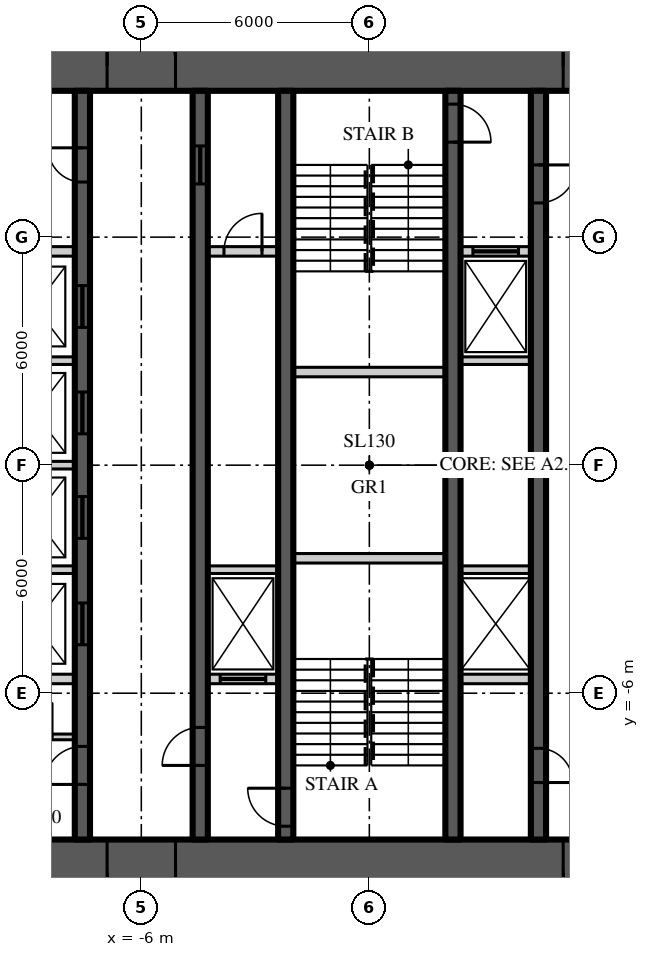
"""IFC4 building model, lengths in metres.
Left out: names, types, materials, properties, quantities, classifications, styles, units other than length and angle.
Written with IfcOpenShell. Run it as: python <this file> out.ifc"""

import sys

from ifc_helpers import new_model, si_unit, direction, frame, frame_2d, origin, place, context, subcontext, project, spatial, rectangle, extrude, element, fill, save


model = new_model("IFC4")
c1 = context("Model", 3, precision=1e-05, world=origin(), true_north=direction((0.0, 1.0)))
c2 = subcontext(c1, "Body", "Model", "MODEL_VIEW")
j1 = project(units=[si_unit("LENGTHUNIT", "METRE"), si_unit("PLANEANGLEUNIT", "RADIAN")], contexts=[c1])
p1 = place(None, origin())
s1 = spatial("IfcSite", under=j1, at=p1, CompositionType="ELEMENT")
p2 = place(p1, origin())
s2 = spatial("IfcBuilding", under=s1, at=p2, CompositionType="ELEMENT")
p3 = place(p2, frame((0.0, 0.0, 82.5)))
s3 = spatial("IfcBuildingStorey", under=s2, at=p3, CompositionType="ELEMENT", Elevation=82.5)
p4 = place(p3, frame((-11.15, 10.5, 0.0), z_axis=(0.0, 0.0, 1.0), x_axis=(1.0, 0.0, 0.0)))
e1 = element("IfcWall", 1, at=p4, inside=s3, PredefinedType="SHEAR", context=c2, shape_type="SweptSolid", body=[
    extrude(rectangle(XDim=22.3, YDim=1.3, at=frame_2d((11.15, 0.0))), origin(), (0.0, 0.0, 1.0), 3.9),
])
p5 = place(p4, frame((4.25, 0.0, 0.0)))
e2 = element("IfcOpeningElement", 2, at=p5, cuts=e1, PredefinedType="OPENING", context=c2, shape_type="SweptSolid", body=[
    extrude(rectangle(XDim=1.8, YDim=2.2, at=frame_2d((0.9, 1.1))), frame((0.0, 0.66, 0.0), z_axis=(0.0, -1.0, 0.0), x_axis=(1.0, 0.0, 0.0)), (0.0, 0.0, 1.0), 1.32),
])
p6 = place(p4, frame((16.25, 0.0, 0.0)))
e3 = element("IfcOpeningElement", 3, at=p6, cuts=e1, PredefinedType="OPENING", context=c2, shape_type="SweptSolid", body=[
    extrude(rectangle(XDim=1.8, YDim=2.2, at=frame_2d((0.9, 1.1))), frame((0.0, 0.66, 0.0), z_axis=(0.0, -1.0, 0.0), x_axis=(1.0, 0.0, 0.0)), (0.0, 0.0, 1.0), 1.32),
])
p7 = place(p3, frame((11.15, -10.5, 0.0), z_axis=(0.0, 0.0, 1.0), x_axis=(-1.0, 0.0, 0.0)))
e4 = element("IfcWall", 4, at=p7, inside=s3, PredefinedType="SHEAR", context=c2, shape_type="SweptSolid", body=[
    extrude(rectangle(XDim=22.3, YDim=1.3, at=frame_2d((11.15, 0.0))), origin(), (0.0, 0.0, 1.0), 3.9),
])
p8 = place(p7, frame((16.25, 0.0, 0.0)))
e5 = element("IfcOpeningElement", 5, at=p8, cuts=e4, PredefinedType="OPENING", context=c2, shape_type="SweptSolid", body=[
    extrude(rectangle(XDim=1.8, YDim=2.2, at=frame_2d((0.9, 1.1))), frame((0.0, 0.66, 0.0), z_axis=(0.0, -1.0, 0.0), x_axis=(1.0, 0.0, 0.0)), (0.0, 0.0, 1.0), 1.32),
])
p9 = place(p7, frame((4.25, 0.0, 0.0)))
e6 = element("IfcOpeningElement", 6, at=p9, cuts=e4, PredefinedType="OPENING", context=c2, shape_type="SweptSolid", body=[
    extrude(rectangle(XDim=1.8, YDim=2.2, at=frame_2d((0.9, 1.1))), frame((0.0, 0.66, 0.0), z_axis=(0.0, -1.0, 0.0), x_axis=(1.0, 0.0, 0.0)), (0.0, 0.0, 1.0), 1.32),
])
p10 = place(p3, frame((-7.55, -9.85, 0.0), z_axis=(0.0, 0.0, 1.0), x_axis=(0.0, 1.0, 0.0)))
e7 = element("IfcWall", 7, at=p10, inside=s3, PredefinedType="SHEAR", context=c2, shape_type="SweptSolid", body=[
    extrude(rectangle(XDim=19.7, YDim=0.4, at=frame_2d((9.85, 0.0))), origin(), (0.0, 0.0, 1.0), 3.9),
])
p11 = place(p10, frame((1.45, 0.0, 0.0)))
e8 = element("IfcOpeningElement", 8, at=p11, cuts=e7, PredefinedType="OPENING", context=c2, shape_type="SweptSolid", body=[
    extrude(rectangle(XDim=1.0, YDim=2.2, at=frame_2d((0.5, 1.1))), frame((0.0, 0.21, 0.0), z_axis=(0.0, -1.0, 0.0), x_axis=(1.0, 0.0, 0.0)), (0.0, 0.0, 1.0), 0.42),
])
p12 = place(p10, frame((17.3, 0.0, 0.0)))
e9 = element("IfcOpeningElement", 9, at=p12, cuts=e7, PredefinedType="OPENING", context=c2, shape_type="SweptSolid", body=[
    extrude(rectangle(XDim=0.9, YDim=2.1, at=frame_2d((0.45, 1.05))), frame((0.0, 0.21, 0.0), z_axis=(0.0, -1.0, 0.0), x_axis=(1.0, 0.0, 0.0)), (0.0, 0.0, 1.0), 0.42),
])
p13 = place(p10, frame((5.125, 0.0, 0.0)))
e10 = element("IfcOpeningElement", 10, at=p13, cuts=e7, PredefinedType="OPENING", context=c2, shape_type="SweptSolid", body=[
    extrude(rectangle(XDim=1.1, YDim=2.2, at=frame_2d((0.55, 1.1))), frame((0.0, 0.21, 0.0), z_axis=(0.0, -1.0, 0.0), x_axis=(1.0, 0.0, 0.0)), (0.0, 0.0, 1.0), 0.42),
])
p14 = place(p10, frame((7.925, 0.0, 0.0)))
e11 = element("IfcOpeningElement", 11, at=p14, cuts=e7, PredefinedType="OPENING", context=c2, shape_type="SweptSolid", body=[
    extrude(rectangle(XDim=1.1, YDim=2.2, at=frame_2d((0.55, 1.1))), frame((0.0, 0.21, 0.0), z_axis=(0.0, -1.0, 0.0), x_axis=(1.0, 0.0, 0.0)), (0.0, 0.0, 1.0), 0.42),
])
p15 = place(p10, frame((10.675, 0.0, 0.0)))
e12 = element("IfcOpeningElement", 12, at=p15, cuts=e7, PredefinedType="OPENING", context=c2, shape_type="SweptSolid", body=[
    extrude(rectangle(XDim=1.1, YDim=2.2, at=frame_2d((0.55, 1.1))), frame((0.0, 0.21, 0.0), z_axis=(0.0, -1.0, 0.0), x_axis=(1.0, 0.0, 0.0)), (0.0, 0.0, 1.0), 0.42),
])
p16 = place(p10, frame((13.475, 0.0, 0.0)))
e13 = element("IfcOpeningElement", 13, at=p16, cuts=e7, PredefinedType="OPENING", context=c2, shape_type="SweptSolid", body=[
    extrude(rectangle(XDim=1.1, YDim=2.2, at=frame_2d((0.55, 1.1))), frame((0.0, 0.21, 0.0), z_axis=(0.0, -1.0, 0.0), x_axis=(1.0, 0.0, 0.0)), (0.0, 0.0, 1.0), 0.42),
])
p17 = place(p3, frame((-4.45, -9.85, 0.0), z_axis=(0.0, 0.0, 1.0), x_axis=(0.0, 1.0, 0.0)))
e14 = element("IfcWall", 14, at=p17, inside=s3, PredefinedType="SHEAR", context=c2, shape_type="SweptSolid", body=[
    extrude(rectangle(XDim=19.7, YDim=0.4, at=frame_2d((9.85, 0.0))), origin(), (0.0, 0.0, 1.0), 3.9),
])
p18 = place(p17, frame((1.95, 0.0, 0.0)))
e15 = element("IfcOpeningElement", 15, at=p18, cuts=e14, PredefinedType="OPENING", context=c2, shape_type="SweptSolid", body=[
    extrude(rectangle(XDim=1.0, YDim=2.2, at=frame_2d((0.5, 1.1))), frame((0.0, 0.21, 0.0), z_axis=(0.0, -1.0, 0.0), x_axis=(1.0, 0.0, 0.0)), (0.0, 0.0, 1.0), 0.42),
])
p19 = place(p17, frame((17.25, 0.0, 0.0)))
e16 = element("IfcOpeningElement", 16, at=p19, cuts=e14, PredefinedType="OPENING", context=c2, shape_type="SweptSolid", body=[
    extrude(rectangle(XDim=1.0, YDim=2.1, at=frame_2d((0.5, 1.05))), frame((0.0, 0.21, 0.0), z_axis=(0.0, -1.0, 0.0), x_axis=(1.0, 0.0, 0.0)), (0.0, 0.0, 1.0), 0.42),
])
p20 = place(p3, frame((4.45, 9.85, 0.0), z_axis=(0.0, 0.0, 1.0), x_axis=(0.0, -1.0, 0.0)))
e17 = element("IfcWall", 17, at=p20, inside=s3, PredefinedType="SHEAR", context=c2, shape_type="SweptSolid", body=[
    extrude(rectangle(XDim=19.7, YDim=0.4, at=frame_2d((9.85, 0.0))), origin(), (0.0, 0.0, 1.0), 3.9),
])
p21 = place(p20, frame((1.95, 0.0, 0.0)))
e18 = element("IfcOpeningElement", 18, at=p21, cuts=e17, PredefinedType="OPENING", context=c2, shape_type="SweptSolid", body=[
    extrude(rectangle(XDim=1.0, YDim=2.2, at=frame_2d((0.5, 1.1))), frame((0.0, 0.21, 0.0), z_axis=(0.0, -1.0, 0.0), x_axis=(1.0, 0.0, 0.0)), (0.0, 0.0, 1.0), 0.42),
])
p22 = place(p20, frame((17.3, 0.0, 0.0)))
e19 = element("IfcOpeningElement", 19, at=p22, cuts=e17, PredefinedType="OPENING", context=c2, shape_type="SweptSolid", body=[
    extrude(rectangle(XDim=0.9, YDim=2.1, at=frame_2d((0.45, 1.05))), frame((0.0, 0.21, 0.0), z_axis=(0.0, -1.0, 0.0), x_axis=(1.0, 0.0, 0.0)), (0.0, 0.0, 1.0), 0.42),
])
p23 = place(p3, frame((-2.2, -9.85, 0.0), z_axis=(0.0, 0.0, 1.0), x_axis=(0.0, 1.0, 0.0)))
e20 = element("IfcWall", 20, at=p23, inside=s3, PredefinedType="SHEAR", context=c2, shape_type="SweptSolid", body=[
    extrude(rectangle(XDim=19.7, YDim=0.4, at=frame_2d((9.85, 0.0))), origin(), (0.0, 0.0, 1.0), 3.9),
])
p24 = place(p23, frame((0.35, 0.0, 0.0)))
e21 = element("IfcOpeningElement", 21, at=p24, cuts=e20, PredefinedType="OPENING", context=c2, shape_type="SweptSolid", body=[
    extrude(rectangle(XDim=1.0, YDim=2.2, at=frame_2d((0.5, 1.1))), frame((0.0, 0.21, 0.0), z_axis=(0.0, -1.0, 0.0), x_axis=(1.0, 0.0, 0.0)), (0.0, 0.0, 1.0), 0.42),
])
p25 = place(p3, frame((2.2, 9.85, 0.0), z_axis=(0.0, 0.0, 1.0), x_axis=(0.0, -1.0, 0.0)))
e22 = element("IfcWall", 22, at=p25, inside=s3, PredefinedType="SHEAR", context=c2, shape_type="SweptSolid", body=[
    extrude(rectangle(XDim=19.7, YDim=0.4, at=frame_2d((9.85, 0.0))), origin(), (0.0, 0.0, 1.0), 3.9),
])
p26 = place(p25, frame((0.35, 0.0, 0.0)))
e23 = element("IfcOpeningElement", 23, at=p26, cuts=e22, PredefinedType="OPENING", context=c2, shape_type="SweptSolid", body=[
    extrude(rectangle(XDim=1.0, YDim=2.2, at=frame_2d((0.5, 1.1))), frame((0.0, 0.21, 0.0), z_axis=(0.0, -1.0, 0.0), x_axis=(1.0, 0.0, 0.0)), (0.0, 0.0, 1.0), 0.42),
])
p27 = place(p3, frame((-9.85, 5.625, 0.0), z_axis=(0.0, 0.0, 1.0), x_axis=(1.0, 0.0, 0.0)))
e24 = element("IfcWall", 24, at=p27, inside=s3, PredefinedType="SOLIDWALL", context=c2, shape_type="SweptSolid", body=[
    extrude(rectangle(XDim=2.1, YDim=0.25, at=frame_2d((1.05, 0.0))), origin(), (0.0, 0.0, 1.0), 3.7),
])
p28 = place(p3, frame((-4.25, 5.625, 0.0), z_axis=(0.0, 0.0, 1.0), x_axis=(1.0, 0.0, 0.0)))
e25 = element("IfcWall", 25, at=p28, inside=s3, PredefinedType="SOLIDWALL", context=c2, shape_type="SweptSolid", body=[
    extrude(rectangle(XDim=1.85, YDim=0.25, at=frame_2d((0.925, 0.0))), origin(), (0.0, 0.0, 1.0), 3.7),
])
p29 = place(p28, frame((0.425, 0.0, 0.0)))
e26 = element("IfcOpeningElement", 26, at=p29, cuts=e25, PredefinedType="OPENING", context=c2, shape_type="SweptSolid", body=[
    extrude(rectangle(XDim=1.0, YDim=2.2, at=frame_2d((0.5, 1.1))), frame((0.0, 0.135, 0.0), z_axis=(0.0, -1.0, 0.0), x_axis=(1.0, 0.0, 0.0)), (0.0, 0.0, 1.0), 0.27),
])
p30 = place(p3, frame((2.4, 5.625, 0.0), z_axis=(0.0, 0.0, 1.0), x_axis=(1.0, 0.0, 0.0)))
e27 = element("IfcWall", 27, at=p30, inside=s3, PredefinedType="SOLIDWALL", context=c2, shape_type="SweptSolid", body=[
    extrude(rectangle(XDim=1.85, YDim=0.25, at=frame_2d((0.925, 0.0))), origin(), (0.0, 0.0, 1.0), 3.7),
])
p31 = place(p30, frame((0.325, 0.0, 0.0)))
e28 = element("IfcOpeningElement", 28, at=p31, cuts=e27, PredefinedType="OPENING", context=c2, shape_type="SweptSolid", body=[
    extrude(rectangle(XDim=1.2, YDim=2.2, at=frame_2d((0.6, 1.1))), frame((0.0, 0.135, 0.0), z_axis=(0.0, -1.0, 0.0), x_axis=(1.0, 0.0, 0.0)), (0.0, 0.0, 1.0), 0.27),
])
p32 = place(p3, frame((-9.85, -5.625, 0.0), z_axis=(0.0, 0.0, 1.0), x_axis=(1.0, 0.0, 0.0)))
e29 = element("IfcWall", 29, at=p32, inside=s3, PredefinedType="SOLIDWALL", context=c2, shape_type="SweptSolid", body=[
    extrude(rectangle(XDim=2.1, YDim=0.25, at=frame_2d((1.05, 0.0))), origin(), (0.0, 0.0, 1.0), 3.7),
])
p33 = place(p3, frame((-4.25, -5.625, 0.0), z_axis=(0.0, 0.0, 1.0), x_axis=(1.0, 0.0, 0.0)))
e30 = element("IfcWall", 30, at=p33, inside=s3, PredefinedType="SOLIDWALL", context=c2, shape_type="SweptSolid", body=[
    extrude(rectangle(XDim=1.85, YDim=0.25, at=frame_2d((0.925, 0.0))), origin(), (0.0, 0.0, 1.0), 3.7),
])
p34 = place(p33, frame((0.325, 0.0, 0.0)))
e31 = element("IfcOpeningElement", 31, at=p34, cuts=e30, PredefinedType="OPENING", context=c2, shape_type="SweptSolid", body=[
    extrude(rectangle(XDim=1.2, YDim=2.2, at=frame_2d((0.6, 1.1))), frame((0.0, 0.135, 0.0), z_axis=(0.0, -1.0, 0.0), x_axis=(1.0, 0.0, 0.0)), (0.0, 0.0, 1.0), 0.27),
])
p35 = place(p3, frame((2.4, -5.625, 0.0), z_axis=(0.0, 0.0, 1.0), x_axis=(1.0, 0.0, 0.0)))
e32 = element("IfcWall", 32, at=p35, inside=s3, PredefinedType="SOLIDWALL", context=c2, shape_type="SweptSolid", body=[
    extrude(rectangle(XDim=1.85, YDim=0.25, at=frame_2d((0.925, 0.0))), origin(), (0.0, 0.0, 1.0), 3.7),
])
for number, where, z_axis, x_axis in (
    (33, (-2.0, -2.45, 0.0), (0.0, 0.0, 1.0), (1.0, 0.0, 0.0)),
    (34, (-2.0, 2.45, 0.0), (0.0, 0.0, 1.0), (1.0, 0.0, 0.0)),
):
    element("IfcWall", number, at=place(p3, frame(where, z_axis=z_axis, x_axis=x_axis)), inside=s3, PredefinedType="SOLIDWALL", context=c2, shape_type="SweptSolid", body=[
        extrude(rectangle(XDim=4.0, YDim=0.25, at=frame_2d((2.0, 0.0))), origin(), (0.0, 0.0, 1.0), 3.7),
    ])
p36 = place(p3, frame((-9.85, -2.75, 0.0), z_axis=(0.0, 0.0, 1.0), x_axis=(1.0, 0.0, 0.0)))
e35 = element("IfcWall", 35, at=p36, inside=s3, PredefinedType="SOLIDWALL", context=c2, shape_type="SweptSolid", body=[
    extrude(rectangle(XDim=2.1, YDim=0.2, at=frame_2d((1.05, 0.0))), origin(), (0.0, 0.0, 1.0), 3.7),
])
for number, where, z_axis, x_axis in (
    (36, (-4.25, -2.75, 0.0), (0.0, 0.0, 1.0), (1.0, 0.0, 0.0)),
    (37, (2.4, -2.75, 0.0), (0.0, 0.0, 1.0), (1.0, 0.0, 0.0)),
):
    element("IfcWall", number, at=place(p3, frame(where, z_axis=z_axis, x_axis=x_axis)), inside=s3, PredefinedType="SOLIDWALL", context=c2, shape_type="SweptSolid", body=[
        extrude(rectangle(XDim=1.85, YDim=0.2, at=frame_2d((0.925, 0.0))), origin(), (0.0, 0.0, 1.0), 3.7),
    ])
for number, where, z_axis, x_axis in (
    (38, (-9.85, 0.0, 0.0), (0.0, 0.0, 1.0), (1.0, 0.0, 0.0)),
    (39, (-9.85, 2.75, 0.0), (0.0, 0.0, 1.0), (1.0, 0.0, 0.0)),
):
    element("IfcWall", number, at=place(p3, frame(where, z_axis=z_axis, x_axis=x_axis)), inside=s3, PredefinedType="SOLIDWALL", context=c2, shape_type="SweptSolid", body=[
        extrude(rectangle(XDim=2.1, YDim=0.2, at=frame_2d((1.05, 0.0))), origin(), (0.0, 0.0, 1.0), 3.7),
    ])
p37 = place(p3, frame((2.4, 2.75, 0.0), z_axis=(0.0, 0.0, 1.0), x_axis=(1.0, 0.0, 0.0)))
e40 = element("IfcWall", 40, at=p37, inside=s3, PredefinedType="SOLIDWALL", context=c2, shape_type="SweptSolid", body=[
    extrude(rectangle(XDim=1.85, YDim=0.2, at=frame_2d((0.925, 0.0))), origin(), (0.0, 0.0, 1.0), 3.7),
])
p38 = place(p3, frame((-9.85, -7.15, 0.0), z_axis=(0.0, 0.0, 1.0), x_axis=(1.0, 0.0, 0.0)))
e41 = element("IfcWall", 41, at=p38, inside=s3, PredefinedType="SOLIDWALL", context=c2, shape_type="SweptSolid", body=[
    extrude(rectangle(XDim=2.1, YDim=0.15, at=frame_2d((1.05, 0.0))), origin(), (0.0, 0.0, 1.0), 3.77),
])
p39 = place(p38, frame((0.6, 0.0, 0.0)))
e42 = element("IfcOpeningElement", 42, at=p39, cuts=e41, PredefinedType="OPENING", context=c2, shape_type="SweptSolid", body=[
    extrude(rectangle(XDim=0.9, YDim=2.1, at=frame_2d((0.45, 1.05))), frame((0.0, 0.085, 0.0), z_axis=(0.0, -1.0, 0.0), x_axis=(1.0, 0.0, 0.0)), (0.0, 0.0, 1.0), 0.17),
])
p40 = place(p5, origin())
e43 = element("IfcDoor", 43, at=p40, inside=s3, OperationType="DOUBLE_DOOR_DOUBLE_SWING", PredefinedType="DOOR", context=c2, shape_type="SweptSolid", body=[
    extrude(rectangle(XDim=1.8, YDim=2.2, at=frame_2d((0.9, 1.1))), frame((0.0, 0.025, 0.0), z_axis=(0.0, -1.0, 0.0), x_axis=(1.0, 0.0, 0.0)), (0.0, 0.0, 1.0), 0.05),
])
fill(e2, e43)
p41 = place(p8, origin())
e44 = element("IfcDoor", 44, at=p41, inside=s3, OperationType="DOUBLE_DOOR_DOUBLE_SWING", PredefinedType="DOOR", context=c2, shape_type="SweptSolid", body=[
    extrude(rectangle(XDim=1.8, YDim=2.2, at=frame_2d((0.9, 1.1))), frame((0.0, 0.025, 0.0), z_axis=(0.0, -1.0, 0.0), x_axis=(1.0, 0.0, 0.0)), (0.0, 0.0, 1.0), 0.05),
])
fill(e5, e44)
p42 = place(p6, origin())
e45 = element("IfcDoor", 45, at=p42, inside=s3, OperationType="DOUBLE_DOOR_DOUBLE_SWING", PredefinedType="DOOR", context=c2, shape_type="SweptSolid", body=[
    extrude(rectangle(XDim=1.8, YDim=2.2, at=frame_2d((0.9, 1.1))), frame((0.0, 0.025, 0.0), z_axis=(0.0, -1.0, 0.0), x_axis=(1.0, 0.0, 0.0)), (0.0, 0.0, 1.0), 0.05),
])
fill(e3, e45)
p43 = place(p9, origin())
e46 = element("IfcDoor", 46, at=p43, inside=s3, OperationType="DOUBLE_DOOR_DOUBLE_SWING", PredefinedType="DOOR", context=c2, shape_type="SweptSolid", body=[
    extrude(rectangle(XDim=1.8, YDim=2.2, at=frame_2d((0.9, 1.1))), frame((0.0, 0.025, 0.0), z_axis=(0.0, -1.0, 0.0), x_axis=(1.0, 0.0, 0.0)), (0.0, 0.0, 1.0), 0.05),
])
fill(e6, e46)
p44 = place(p11, origin())
e47 = element("IfcDoor", 47, at=p44, inside=s3, OperationType="SINGLE_SWING_LEFT", PredefinedType="DOOR", context=c2, shape_type="SweptSolid", body=[
    extrude(rectangle(XDim=1.0, YDim=2.2, at=frame_2d((0.5, 1.1))), frame((0.0, 0.025, 0.0), z_axis=(0.0, -1.0, 0.0), x_axis=(1.0, 0.0, 0.0)), (0.0, 0.0, 1.0), 0.05),
])
fill(e8, e47)
p45 = place(p18, origin())
e48 = element("IfcDoor", 48, at=p45, inside=s3, OperationType="SINGLE_SWING_LEFT", PredefinedType="DOOR", context=c2, shape_type="SweptSolid", body=[
    extrude(rectangle(XDim=1.0, YDim=2.2, at=frame_2d((0.5, 1.1))), frame((0.0, 0.025, 0.0), z_axis=(0.0, -1.0, 0.0), x_axis=(1.0, 0.0, 0.0)), (0.0, 0.0, 1.0), 0.05),
])
fill(e15, e48)
p46 = place(p24, origin())
e49 = element("IfcDoor", 49, at=p46, inside=s3, OperationType="SINGLE_SWING_RIGHT", PredefinedType="DOOR", context=c2, shape_type="SweptSolid", body=[
    extrude(rectangle(XDim=1.0, YDim=2.2, at=frame_2d((0.5, 1.1))), frame((0.0, 0.025, 0.0), z_axis=(0.0, -1.0, 0.0), x_axis=(1.0, 0.0, 0.0)), (0.0, 0.0, 1.0), 0.05),
])
fill(e21, e49)
p47 = place(p21, origin())
e50 = element("IfcDoor", 50, at=p47, inside=s3, OperationType="SINGLE_SWING_LEFT", PredefinedType="DOOR", context=c2, shape_type="SweptSolid", body=[
    extrude(rectangle(XDim=1.0, YDim=2.2, at=frame_2d((0.5, 1.1))), frame((0.0, 0.025, 0.0), z_axis=(0.0, -1.0, 0.0), x_axis=(1.0, 0.0, 0.0)), (0.0, 0.0, 1.0), 0.05),
])
fill(e18, e50)
p48 = place(p26, origin())
e51 = element("IfcDoor", 51, at=p48, inside=s3, OperationType="SINGLE_SWING_RIGHT", PredefinedType="DOOR", context=c2, shape_type="SweptSolid", body=[
    extrude(rectangle(XDim=1.0, YDim=2.2, at=frame_2d((0.5, 1.1))), frame((0.0, 0.025, 0.0), z_axis=(0.0, -1.0, 0.0), x_axis=(1.0, 0.0, 0.0)), (0.0, 0.0, 1.0), 0.05),
])
fill(e23, e51)
p49 = place(p12, origin())
e52 = element("IfcDoor", 52, at=p49, inside=s3, OperationType="SINGLE_SWING_RIGHT", PredefinedType="DOOR", context=c2, shape_type="SweptSolid", body=[
    extrude(rectangle(XDim=0.9, YDim=2.1, at=frame_2d((0.45, 1.05))), frame((0.0, 0.025, 0.0), z_axis=(0.0, -1.0, 0.0), x_axis=(1.0, 0.0, 0.0)), (0.0, 0.0, 1.0), 0.05),
])
fill(e9, e52)
p50 = place(p19, origin())
e53 = element("IfcDoor", 53, at=p50, inside=s3, OperationType="SLIDING_TO_LEFT", PredefinedType="DOOR", context=c2, shape_type="SweptSolid", body=[
    extrude(rectangle(XDim=1.0, YDim=2.1, at=frame_2d((0.5, 1.05))), frame((0.0, 0.025, 0.0), z_axis=(0.0, -1.0, 0.0), x_axis=(1.0, 0.0, 0.0)), (0.0, 0.0, 1.0), 0.05),
])
fill(e16, e53)
p51 = place(p22, origin())
e54 = element("IfcDoor", 54, at=p51, inside=s3, OperationType="SINGLE_SWING_RIGHT", PredefinedType="DOOR", context=c2, shape_type="SweptSolid", body=[
    extrude(rectangle(XDim=0.9, YDim=2.1, at=frame_2d((0.45, 1.05))), frame((0.0, 0.025, 0.0), z_axis=(0.0, -1.0, 0.0), x_axis=(1.0, 0.0, 0.0)), (0.0, 0.0, 1.0), 0.05),
])
fill(e19, e54)
p52 = place(p13, origin())
e55 = element("IfcDoor", 55, at=p52, inside=s3, OperationType="SLIDING_TO_LEFT", PredefinedType="DOOR", context=c2, shape_type="SweptSolid", body=[
    extrude(rectangle(XDim=1.1, YDim=2.2, at=frame_2d((0.55, 1.1))), frame((0.0, 0.025, 0.0), z_axis=(0.0, -1.0, 0.0), x_axis=(1.0, 0.0, 0.0)), (0.0, 0.0, 1.0), 0.05),
])
fill(e10, e55)
p53 = place(p14, origin())
e56 = element("IfcDoor", 56, at=p53, inside=s3, OperationType="SLIDING_TO_LEFT", PredefinedType="DOOR", context=c2, shape_type="SweptSolid", body=[
    extrude(rectangle(XDim=1.1, YDim=2.2, at=frame_2d((0.55, 1.1))), frame((0.0, 0.025, 0.0), z_axis=(0.0, -1.0, 0.0), x_axis=(1.0, 0.0, 0.0)), (0.0, 0.0, 1.0), 0.05),
])
fill(e11, e56)
p54 = place(p15, origin())
e57 = element("IfcDoor", 57, at=p54, inside=s3, OperationType="SLIDING_TO_LEFT", PredefinedType="DOOR", context=c2, shape_type="SweptSolid", body=[
    extrude(rectangle(XDim=1.1, YDim=2.2, at=frame_2d((0.55, 1.1))), frame((0.0, 0.025, 0.0), z_axis=(0.0, -1.0, 0.0), x_axis=(1.0, 0.0, 0.0)), (0.0, 0.0, 1.0), 0.05),
])
fill(e12, e57)
p55 = place(p16, origin())
e58 = element("IfcDoor", 58, at=p55, inside=s3, OperationType="SLIDING_TO_LEFT", PredefinedType="DOOR", context=c2, shape_type="SweptSolid", body=[
    extrude(rectangle(XDim=1.1, YDim=2.2, at=frame_2d((0.55, 1.1))), frame((0.0, 0.025, 0.0), z_axis=(0.0, -1.0, 0.0), x_axis=(1.0, 0.0, 0.0)), (0.0, 0.0, 1.0), 0.05),
])
fill(e13, e58)
p56 = place(p34, origin())
e59 = element("IfcDoor", 59, at=p56, inside=s3, OperationType="SLIDING_TO_LEFT", PredefinedType="DOOR", context=c2, shape_type="SweptSolid", body=[
    extrude(rectangle(XDim=1.2, YDim=2.2, at=frame_2d((0.6, 1.1))), frame((0.0, 0.025, 0.0), z_axis=(0.0, -1.0, 0.0), x_axis=(1.0, 0.0, 0.0)), (0.0, 0.0, 1.0), 0.05),
])
fill(e31, e59)
p57 = place(p31, origin())
e60 = element("IfcDoor", 60, at=p57, inside=s3, OperationType="SLIDING_TO_LEFT", PredefinedType="DOOR", context=c2, shape_type="SweptSolid", body=[
    extrude(rectangle(XDim=1.2, YDim=2.2, at=frame_2d((0.6, 1.1))), frame((0.0, 0.025, 0.0), z_axis=(0.0, -1.0, 0.0), x_axis=(1.0, 0.0, 0.0)), (0.0, 0.0, 1.0), 0.05),
])
fill(e28, e60)
p58 = place(p29, origin())
e61 = element("IfcDoor", 61, at=p58, inside=s3, OperationType="SINGLE_SWING_RIGHT", PredefinedType="DOOR", context=c2, shape_type="SweptSolid", body=[
    extrude(rectangle(XDim=1.0, YDim=2.2, at=frame_2d((0.5, 1.1))), frame((0.0, 0.025, 0.0), z_axis=(0.0, -1.0, 0.0), x_axis=(1.0, 0.0, 0.0)), (0.0, 0.0, 1.0), 0.05),
])
fill(e26, e61)
save(model, sys.argv[1])
